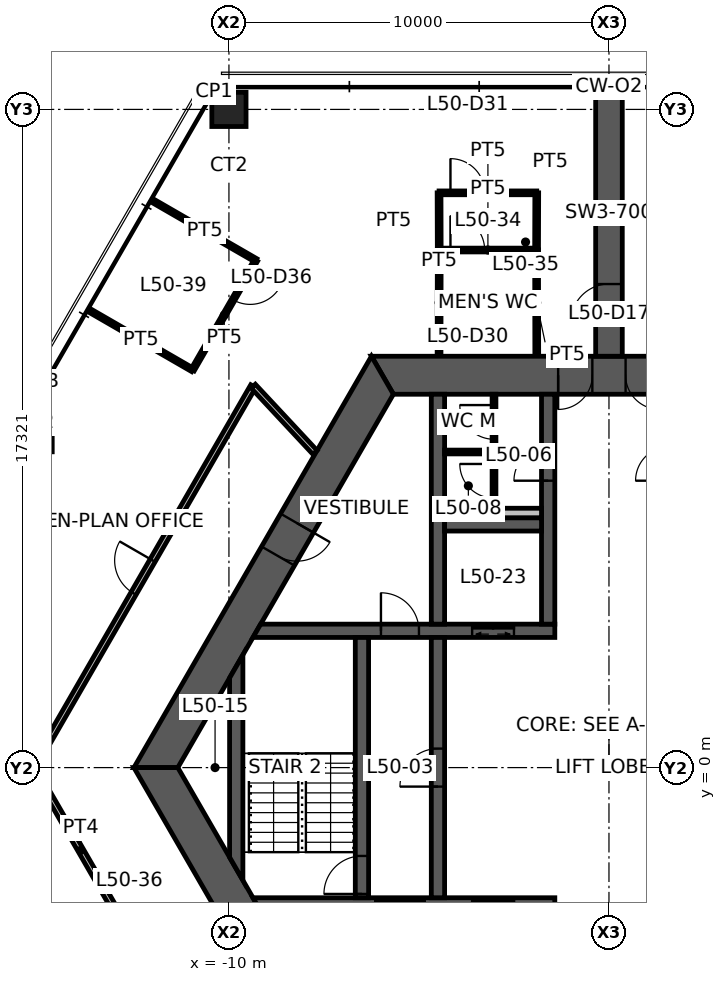
"""IFC4 building model, lengths in metres.
Left out: names, types, materials, properties, quantities, classifications, styles, units other than length and angle.
Written with IfcOpenShell. Run it as: python <this file> out.ifc"""

import sys

from ifc_helpers import new_model, si_unit, direction, frame, frame_2d, origin, origin_2d, place, context, subcontext, project, spatial, polyline, rectangle, hollow_rectangle, outline, extrude, element, fill, save


model = new_model("IFC4")
c1 = context("Model", 3, precision=1e-05, world=origin(), true_north=direction((0.0, 1.0)))
c2 = subcontext(c1, "Body", "Model", "MODEL_VIEW")
j1 = project(units=[si_unit("LENGTHUNIT", "METRE"), si_unit("PLANEANGLEUNIT", "RADIAN")], contexts=[c1])
p1 = place(None, origin())
s1 = spatial("IfcSite", under=j1, at=p1, CompositionType="ELEMENT")
p2 = place(p1, origin())
s2 = spatial("IfcBuilding", under=s1, at=p2, CompositionType="ELEMENT")
p3 = place(p2, frame((0.0, 0.0, 199.4)))
s3 = spatial("IfcBuildingStorey", under=s2, at=p3, CompositionType="ELEMENT", Elevation=199.4)
p4 = place(p3, frame((-10.0, 17.321, 0.0), z_axis=(0.0, 0.0, 1.0), x_axis=(1.0, 0.0, 0.0)))
e1 = element("IfcColumn", 1, at=p4, inside=s3, PredefinedType="COLUMN", context=c2, shape_type="SweptSolid", body=[
    extrude(hollow_rectangle(XDim=0.9, YDim=0.9, WallThickness=0.09, at=origin_2d()), origin(), (0.0, 0.0, 1.0), 3.9),
])
p5 = place(p3, frame((5.961, 10.325, 0.0), z_axis=(0.0, 0.0, 1.0), x_axis=(-1.0, 0.0, 0.0)))
e2 = element("IfcWall", 2, at=p5, inside=s3, PredefinedType="SHEAR", context=c2, shape_type="SweptSolid", body=[
    extrude(outline(polyline([(-0.289, -0.5), (4.624, -0.5), (5.523, -0.5), (6.399, -0.5), (7.299, -0.5), (12.211, -0.5), (11.634, 0.5), (7.299, 0.5), (6.399, 0.5), (5.523, 0.5), (4.624, 0.5), (0.289, 0.5), (-0.289, -0.5)])), origin(), (0.0, 0.0, 1.0), 3.9),
])
p6 = place(p5, frame((6.399, 0.0, 0.0)))
e3 = element("IfcOpeningElement", 3, at=p6, cuts=e2, PredefinedType="OPENING", context=c2, shape_type="SweptSolid", body=[
    extrude(rectangle(XDim=0.9, YDim=2.1, at=frame_2d((0.45, 1.05))), frame((0.0, 0.51, 0.0), z_axis=(0.0, -1.0, 0.0), x_axis=(1.0, 0.0, 0.0)), (0.0, 0.0, 1.0), 1.02),
])
p7 = place(p5, frame((4.624, 0.0, 0.0)))
e4 = element("IfcOpeningElement", 4, at=p7, cuts=e2, PredefinedType="OPENING", context=c2, shape_type="SweptSolid", body=[
    extrude(rectangle(XDim=0.9, YDim=2.1, at=frame_2d((0.45, 1.05))), frame((0.0, 0.51, 0.0), z_axis=(0.0, -1.0, 0.0), x_axis=(1.0, 0.0, 0.0)), (0.0, 0.0, 1.0), 1.02),
])
p8 = place(p3, frame((-5.961, 10.325, 0.0), z_axis=(0.0, 0.0, 1.0), x_axis=(-0.500004296715, -0.866022923061, 0.0)))
e5 = element("IfcWall", 5, at=p8, inside=s3, PredefinedType="SHEAR", context=c2, shape_type="SweptSolid", body=[
    extrude(outline(polyline([(-0.289, -0.5), (4.494, -0.5), (5.494, -0.5), (12.211, -0.5), (11.634, 0.5), (5.494, 0.5), (4.494, 0.5), (0.289, 0.5), (-0.289, -0.5)])), origin(), (0.0, 0.0, 1.0), 3.9),
])
p9 = place(p8, frame((4.494, 0.0, 0.0)))
e6 = element("IfcOpeningElement", 6, at=p9, cuts=e5, PredefinedType="OPENING", context=c2, shape_type="SweptSolid", body=[
    extrude(rectangle(XDim=1.0, YDim=2.1, at=frame_2d((0.5, 1.05))), frame((0.0, 0.51, 0.0), z_axis=(0.0, -1.0, 0.0), x_axis=(1.0, 0.0, 0.0)), (0.0, 0.0, 1.0), 1.02),
])
p10 = place(p3, frame((-11.922, 0.0, 0.0), z_axis=(0.0, 0.0, 1.0), x_axis=(0.500004296715, -0.866022923061, 0.0)))
e7 = element("IfcWall", 7, at=p10, inside=s3, PredefinedType="SHEAR", context=c2, shape_type="SweptSolid", body=[
    extrude(outline(polyline([(-0.289, -0.5), (6.331, -0.5), (7.131, -0.5), (12.211, -0.5), (11.634, 0.5), (7.131, 0.5), (6.331, 0.5), (0.289, 0.5), (-0.289, -0.5)])), origin(), (0.0, 0.0, 1.0), 3.9),
])
p11 = place(p10, frame((6.331, 0.0, 0.0)))
e8 = element("IfcOpeningElement", 8, at=p11, cuts=e7, PredefinedType="OPENING", context=c2, shape_type="SweptSolid", body=[
    extrude(rectangle(XDim=0.8, YDim=2.1, at=frame_2d((0.4, 1.05))), frame((0.0, 0.51, 0.0), z_axis=(0.0, -1.0, 0.0), x_axis=(1.0, 0.0, 0.0)), (0.0, 0.0, 1.0), 1.02),
])
p12 = place(p3, frame((0.0, 10.825, 0.0), z_axis=(0.0, 0.0, 1.0), x_axis=(0.0, 1.0, 0.0)))
e9 = element("IfcWall", 9, at=p12, inside=s3, PredefinedType="SHEAR", context=c2, shape_type="SweptSolid", body=[
    extrude(rectangle(XDim=6.946, YDim=0.7, at=frame_2d((3.473, 0.0))), origin(), (0.0, 0.0, 1.0), 3.9),
])
p13 = place(p12, frame((0.9, 0.0, 0.0)))
e10 = element("IfcOpeningElement", 10, at=p13, cuts=e9, PredefinedType="OPENING", context=c2, shape_type="SweptSolid", body=[
    extrude(rectangle(XDim=1.0, YDim=2.1, at=frame_2d((0.5, 1.05))), frame((0.0, 0.36, 0.0), z_axis=(0.0, -1.0, 0.0), x_axis=(1.0, 0.0, 0.0)), (0.0, 0.0, 1.0), 0.72),
])
p14 = place(p3, frame((-9.266, 3.6, 0.0), z_axis=(0.0, 0.0, 1.0), x_axis=(1.0, 0.0, 0.0)))
e11 = element("IfcWall", 11, at=p14, inside=s3, PredefinedType="SHEAR", context=c2, shape_type="SweptSolid", body=[
    extrude(outline(polyline([(-0.101, -0.175), (3.266, -0.175), (4.266, -0.175), (5.667, -0.175), (6.767, -0.175), (7.841, -0.175), (7.841, 0.175), (6.767, 0.175), (5.667, 0.175), (4.266, 0.175), (3.266, 0.175), (0.101, 0.175), (-0.101, -0.175)])), origin(), (0.0, 0.0, 1.0), 3.9),
])
p15 = place(p14, frame((3.266, 0.0, 0.0)))
e12 = element("IfcOpeningElement", 12, at=p15, cuts=e11, PredefinedType="OPENING", context=c2, shape_type="SweptSolid", body=[
    extrude(rectangle(XDim=1.0, YDim=2.1, at=frame_2d((0.5, 1.05))), frame((0.0, 0.185, 0.0), z_axis=(0.0, -1.0, 0.0), x_axis=(1.0, 0.0, 0.0)), (0.0, 0.0, 1.0), 0.37),
])
p16 = place(p14, frame((5.667, 0.0, 0.0)))
e13 = element("IfcOpeningElement", 13, at=p16, cuts=e11, PredefinedType="OPENING", context=c2, shape_type="SweptSolid", body=[
    extrude(rectangle(XDim=1.1, YDim=2.1, at=frame_2d((0.55, 1.05))), frame((0.0, 0.185, 0.0), z_axis=(0.0, -1.0, 0.0), x_axis=(1.0, 0.0, 0.0)), (0.0, 0.0, 1.0), 0.37),
])
p17 = place(p3, frame((-9.266, -3.6, 0.0), z_axis=(0.0, 0.0, 1.0), x_axis=(1.0, 0.0, 0.0)))
e14 = element("IfcWall", 14, at=p17, inside=s3, PredefinedType="SHEAR", context=c2, shape_type="SweptSolid", body=[
    extrude(outline(polyline([(0.101, -0.175), (3.116, -0.175), (4.417, -0.175), (5.667, -0.175), (6.767, -0.175), (7.841, -0.175), (7.841, 0.175), (6.767, 0.175), (5.667, 0.175), (4.417, 0.175), (3.116, 0.175), (-0.101, 0.175), (0.101, -0.175)])), origin(), (0.0, 0.0, 1.0), 3.9),
])
p18 = place(p17, frame((5.667, 0.0, 0.0)))
e15 = element("IfcOpeningElement", 15, at=p18, cuts=e14, PredefinedType="OPENING", context=c2, shape_type="SweptSolid", body=[
    extrude(rectangle(XDim=1.1, YDim=2.1, at=frame_2d((0.55, 1.05))), frame((0.0, 0.185, 0.0), z_axis=(0.0, -1.0, 0.0), x_axis=(1.0, 0.0, 0.0)), (0.0, 0.0, 1.0), 0.37),
])
p19 = place(p17, frame((3.116, 0.0, 0.0)))
e16 = element("IfcOpeningElement", 16, at=p19, cuts=e14, PredefinedType="OPENING", context=c2, shape_type="SweptSolid", body=[
    extrude(rectangle(XDim=1.3, YDim=2.1, at=frame_2d((0.65, 1.05))), frame((0.0, 0.185, 0.0), z_axis=(0.0, -1.0, 0.0), x_axis=(1.0, 0.0, 0.0)), (0.0, 0.0, 1.0), 0.37),
])
p20 = place(p3, frame((-1.6, 3.775, 0.0), z_axis=(0.0, 0.0, 1.0), x_axis=(0.0, 1.0, 0.0)))
e17 = element("IfcWall", 17, at=p20, inside=s3, PredefinedType="SHEAR", context=c2, shape_type="SweptSolid", body=[
    extrude(rectangle(XDim=6.05, YDim=0.35, at=frame_2d((3.025, 0.0))), origin(), (0.0, 0.0, 1.0), 3.9),
])
p21 = place(p20, frame((3.775, 0.0, 0.0)))
e18 = element("IfcOpeningElement", 18, at=p21, cuts=e17, PredefinedType="OPENING", context=c2, shape_type="SweptSolid", body=[
    extrude(rectangle(XDim=0.9, YDim=2.1, at=frame_2d((0.45, 1.05))), frame((0.0, 0.185, 0.0), z_axis=(0.0, -1.0, 0.0), x_axis=(1.0, 0.0, 0.0)), (0.0, 0.0, 1.0), 0.37),
])
p22 = place(p3, frame((-4.5, -3.425, 0.0), z_axis=(0.0, 0.0, 1.0), x_axis=(0.0, 1.0, 0.0)))
e19 = element("IfcWall", 19, at=p22, inside=s3, PredefinedType="SHEAR", context=c2, shape_type="SweptSolid", body=[
    extrude(rectangle(XDim=6.85, YDim=0.35, at=frame_2d((3.425, 0.0))), origin(), (0.0, 0.0, 1.0), 3.9),
])
p23 = place(p22, frame((2.925, 0.0, 0.0)))
e20 = element("IfcOpeningElement", 20, at=p23, cuts=e19, PredefinedType="OPENING", context=c2, shape_type="SweptSolid", body=[
    extrude(rectangle(XDim=1.0, YDim=2.1, at=frame_2d((0.5, 1.05))), frame((0.0, 0.185, 0.0), z_axis=(0.0, -1.0, 0.0), x_axis=(1.0, 0.0, 0.0)), (0.0, 0.0, 1.0), 0.37),
])
p24 = place(p3, frame((-6.5, -3.425, 0.0), z_axis=(0.0, 0.0, 1.0), x_axis=(0.0, 1.0, 0.0)))
e21 = element("IfcWall", 21, at=p24, inside=s3, PredefinedType="SHEAR", context=c2, shape_type="SweptSolid", body=[
    extrude(rectangle(XDim=6.85, YDim=0.35, at=frame_2d((3.425, 0.0))), origin(), (0.0, 0.0, 1.0), 3.9),
])
p25 = place(p24, frame((0.1, 0.0, 0.0)))
e22 = element("IfcOpeningElement", 22, at=p25, cuts=e21, PredefinedType="OPENING", context=c2, shape_type="SweptSolid", body=[
    extrude(rectangle(XDim=1.0, YDim=2.1, at=frame_2d((0.5, 1.05))), frame((0.0, 0.185, 0.0), z_axis=(0.0, -1.0, 0.0), x_axis=(1.0, 0.0, 0.0)), (0.0, 0.0, 1.0), 0.37),
])
p26 = place(p3, frame((-4.5, 3.775, 0.0), z_axis=(0.0, 0.0, 1.0), x_axis=(0.0, 1.0, 0.0)))
e23 = element("IfcWall", 23, at=p26, inside=s3, PredefinedType="SHEAR", context=c2, shape_type="SweptSolid", body=[
    extrude(rectangle(XDim=6.05, YDim=0.35, at=frame_2d((3.025, 0.0))), origin(), (0.0, 0.0, 1.0), 3.9),
])
p27 = place(p3, frame((-4.325, 6.4, 0.0), z_axis=(0.0, 0.0, 1.0), x_axis=(1.0, 0.0, 0.0)))
e24 = element("IfcWall", 24, at=p27, inside=s3, PredefinedType="SHEAR", context=c2, shape_type="SweptSolid", body=[
    extrude(rectangle(XDim=2.55, YDim=0.35, at=frame_2d((1.275, 0.0))), origin(), (0.0, 0.0, 1.0), 3.9),
])
p28 = place(p3, frame((-9.808, -2.662, 0.0), z_axis=(0.0, 0.0, 1.0), x_axis=(0.0, 1.0, 0.0)))
e25 = element("IfcWall", 25, at=p28, inside=s3, PredefinedType="SHEAR", context=c2, shape_type="SweptSolid", body=[
    extrude(outline(polyline([(-0.303, -0.175), (5.628, -0.175), (5.021, 0.175), (0.303, 0.175), (-0.303, -0.175)])), origin(), (0.0, 0.0, 1.0), 3.9),
])
p29 = place(p3, frame((-4.325, 6.7, 0.0), z_axis=(0.0, 0.0, 1.0), x_axis=(1.0, 0.0, 0.0)))
e26 = element("IfcWall", 26, at=p29, inside=s3, PredefinedType="PLUMBINGWALL", context=c2, shape_type="SweptSolid", body=[
    extrude(rectangle(XDim=2.55, YDim=0.25, at=frame_2d((1.275, 0.0))), origin(), (0.0, 0.0, 1.0), 3.9),
])
p30 = place(p3, frame((-3.025, 6.575, 0.0), z_axis=(0.0, 0.0, 1.0), x_axis=(0.0, 1.0, 0.0)))
e27 = element("IfcWall", 27, at=p30, inside=s3, PredefinedType="PARTITIONING", context=c2, shape_type="SweptSolid", body=[
    extrude(rectangle(XDim=3.25, YDim=0.1, at=frame_2d((1.625, 0.0))), origin(), (0.0, 0.0, 1.0), 2.35),
])
p31 = place(p30, frame((2.065, 0.0, 0.0)))
e28 = element("IfcOpeningElement", 28, at=p31, cuts=e27, PredefinedType="OPENING", context=c2, shape_type="SweptSolid", body=[
    extrude(rectangle(XDim=0.9, YDim=2.1, at=frame_2d((0.45, 1.05))), frame((0.0, 0.06, 0.0), z_axis=(0.0, -1.0, 0.0), x_axis=(1.0, 0.0, 0.0)), (0.0, 0.0, 1.0), 0.12),
])
p32 = place(p30, frame((0.515, 0.0, 0.0)))
e29 = element("IfcOpeningElement", 29, at=p32, cuts=e27, PredefinedType="OPENING", context=c2, shape_type="SweptSolid", body=[
    extrude(rectangle(XDim=0.9, YDim=2.1, at=frame_2d((0.45, 1.05))), frame((0.0, 0.06, 0.0), z_axis=(0.0, -1.0, 0.0), x_axis=(1.0, 0.0, 0.0)), (0.0, 0.0, 1.0), 0.12),
])
p33 = place(p3, frame((-3.075, 8.305, 0.0), z_axis=(0.0, 0.0, 1.0), x_axis=(-1.0, 0.0, 0.0)))
e30 = element("IfcWall", 30, at=p33, inside=s3, PredefinedType="PARTITIONING", context=c2, shape_type="SweptSolid", body=[
    extrude(rectangle(XDim=1.25, YDim=0.1, at=frame_2d((0.625, 0.0))), origin(), (0.0, 0.0, 1.0), 2.35),
])
p34 = place(p3, frame((-4.471, 13.62, 0.0), z_axis=(0.0, 0.0, 1.0), x_axis=(1.0, 0.0, 0.0)))
e31 = element("IfcWall", 31, at=p34, inside=s3, PredefinedType="PARTITIONING", context=c2, shape_type="SweptSolid", body=[
    extrude(rectangle(XDim=2.571, YDim=0.1, at=frame_2d((1.286, 0.0))), origin(), (0.0, 0.0, 1.0), 2.35),
])
p35 = place(p34, frame((0.3, 0.0, 0.0)))
e32 = element("IfcOpeningElement", 32, at=p35, cuts=e31, PredefinedType="OPENING", context=c2, shape_type="SweptSolid", body=[
    extrude(rectangle(XDim=0.9, YDim=2.1, at=frame_2d((0.45, 1.05))), frame((0.0, 0.06, 0.0), z_axis=(0.0, -1.0, 0.0), x_axis=(1.0, 0.0, 0.0)), (0.0, 0.0, 1.0), 0.12),
])
for number, where, z_axis, x_axis in (
    (33, (-4.471, 10.845, 0.0), (0.0, 0.0, 1.0), (0.002, 1.0, 0.0)),
    (34, (-1.905, 13.625, 0.0), (0.0, 0.0, 1.0), (0.002, -1.0, 0.0)),
):
    element("IfcWall", number, at=place(p3, frame(where, z_axis=z_axis, x_axis=x_axis)), inside=s3, PredefinedType="PARTITIONING", context=c2, shape_type="SweptSolid", body=[
        extrude(rectangle(XDim=2.78, YDim=0.1, at=frame_2d((1.39, 0.0))), origin(), (0.0, 0.0, 1.0), 2.35),
    ])
p36 = place(p3, frame((-4.471, 15.125, 0.0), z_axis=(0.0, 0.0, 1.0), x_axis=(1.0, 0.0, 0.0)))
e35 = element("IfcWall", 35, at=p36, inside=s3, PredefinedType="PARTITIONING", context=c2, shape_type="SweptSolid", body=[
    extrude(rectangle(XDim=2.571, YDim=0.1, at=frame_2d((1.286, 0.0))), origin(), (0.0, 0.0, 1.0), 2.35),
])
p37 = place(p36, frame((0.3, 0.0, 0.0)))
e36 = element("IfcOpeningElement", 36, at=p37, cuts=e35, PredefinedType="OPENING", context=c2, shape_type="SweptSolid", body=[
    extrude(rectangle(XDim=0.9, YDim=2.1, at=frame_2d((0.45, 1.05))), frame((0.0, 0.06, 0.0), z_axis=(0.0, -1.0, 0.0), x_axis=(1.0, 0.0, 0.0)), (0.0, 0.0, 1.0), 0.12),
])
for number, where, z_axis, x_axis in (
    (37, (-4.466, 13.625, 0.0), (0.0, 0.0, 1.0), (-0.003, 1.0, 0.0)),
    (38, (-1.9, 15.125, 0.0), (0.0, 0.0, 1.0), (-0.003, -1.0, 0.0)),
):
    element("IfcWall", number, at=place(p3, frame(where, z_axis=z_axis, x_axis=x_axis)), inside=s3, PredefinedType="PARTITIONING", context=c2, shape_type="SweptSolid", body=[
        extrude(rectangle(XDim=1.5, YDim=0.1, at=frame_2d((0.75, 0.0))), origin(), (0.0, 0.0, 1.0), 2.35),
    ])
p38 = place(p3, frame((-15.156, 0.0, 0.0), z_axis=(0.0, 0.0, 1.0), x_axis=(0.500012970505, 0.86601791513, 0.0)))
e39 = element("IfcWall", 39, at=p38, inside=s3, PredefinedType="PARTITIONING", context=c2, shape_type="SweptSolid", body=[
    extrude(rectangle(XDim=11.591, YDim=0.15, at=frame_2d((5.795, 0.0))), origin(), (0.0, 0.0, 1.0), 2.35),
])
p39 = place(p38, frame((5.295, 0.0, 0.0)))
e40 = element("IfcOpeningElement", 40, at=p39, cuts=e39, PredefinedType="OPENING", context=c2, shape_type="SweptSolid", body=[
    extrude(rectangle(XDim=1.0, YDim=2.1, at=frame_2d((0.5, 1.05))), frame((0.0, 0.085, 0.0), z_axis=(0.0, -1.0, 0.0), x_axis=(1.0, 0.0, 0.0)), (0.0, 0.0, 1.0), 0.17),
])
p40 = place(p3, frame((-12.642, -4.354, 0.0), z_axis=(0.0, 0.0, 1.0), x_axis=(-0.500019495363, 0.866014147839, 0.0)))
e41 = element("IfcWall", 41, at=p40, inside=s3, PredefinedType="PARTITIONING", context=c2, shape_type="SweptSolid", body=[
    extrude(rectangle(XDim=5.028, YDim=0.15, at=frame_2d((2.514, 0.0))), origin(), (0.0, 0.0, 1.0), 2.35),
])
p41 = place(p3, frame((-9.36, 10.038, 0.0), z_axis=(0.0, 0.0, 1.0), x_axis=(0.681997114248, -0.731354863358, 0.0)))
e42 = element("IfcWall", 42, at=p41, inside=s3, PredefinedType="PARTITIONING", context=c2, shape_type="SweptSolid", body=[
    extrude(outline(polyline([(0.0, -0.075), (2.384, -0.075), (2.384, 0.0), (2.382, 0.075), (0.0, 0.075), (0.0, -0.075)])), origin(), (0.0, 0.0, 1.0), 2.35),
])
p42 = place(p3, frame((-11.98, 14.902, 0.0), z_axis=(0.0, 0.0, 1.0), x_axis=(0.866042875753, -0.499969736442, 0.0)))
e43 = element("IfcWall", 43, at=p42, inside=s3, PredefinedType="PARTITIONING", context=c2, shape_type="SweptSolid", body=[
    extrude(rectangle(XDim=3.105, YDim=0.1, at=frame_2d((1.553, 0.0))), origin(), (0.0, 0.0, 1.0), 2.35),
])
p43 = place(p3, frame((-10.956, 10.465, 0.0), z_axis=(0.0, 0.0, 1.0), x_axis=(-0.866012296238, 0.500022702249, 0.0)))
e44 = element("IfcWall", 44, at=p43, inside=s3, PredefinedType="PARTITIONING", context=c2, shape_type="SweptSolid", body=[
    extrude(rectangle(XDim=3.144, YDim=0.1, at=frame_2d((1.572, 0.0))), origin(), (0.0, 0.0, 1.0), 2.35),
])
p44 = place(p3, frame((-9.291, 13.349, 0.0), z_axis=(0.0, 0.0, 1.0), x_axis=(-0.500033344505, -0.86600615147, 0.0)))
e45 = element("IfcWall", 45, at=p44, inside=s3, PredefinedType="PARTITIONING", context=c2, shape_type="SweptSolid", body=[
    extrude(rectangle(XDim=3.331, YDim=0.1, at=frame_2d((1.666, 0.0))), origin(), (0.0, 0.0, 1.0), 2.35),
])
p45 = place(p44, frame((0.3, 0.0, 0.0)))
e46 = element("IfcOpeningElement", 46, at=p45, cuts=e45, PredefinedType="OPENING", context=c2, shape_type="SweptSolid", body=[
    extrude(rectangle(XDim=0.9, YDim=2.1, at=frame_2d((0.45, 1.05))), frame((0.0, 0.06, 0.0), z_axis=(0.0, -1.0, 0.0), x_axis=(1.0, 0.0, 0.0)), (0.0, 0.0, 1.0), 0.12),
])
p46 = place(p3, frame((0.0, 17.771, 0.0), z_axis=(0.0, 0.0, 1.0), x_axis=(0.0, 1.0, 0.0)))
e47 = element("IfcWall", 47, at=p46, inside=s3, PredefinedType="PARTITIONING", context=c2, shape_type="SweptSolid", body=[
    extrude(rectangle(XDim=0.08, YDim=0.175, at=frame_2d((0.04, 0.0))), origin(), (0.0, 0.0, 1.0), 3.9),
])
p47 = place(p6, origin())
e48 = element("IfcDoor", 48, at=p47, inside=s3, OperationType="SINGLE_SWING_RIGHT", PredefinedType="DOOR", context=c2, shape_type="SweptSolid", body=[
    extrude(rectangle(XDim=0.9, YDim=2.1, at=frame_2d((0.45, 1.05))), frame((0.0, 0.025, 0.0), z_axis=(0.0, -1.0, 0.0), x_axis=(1.0, 0.0, 0.0)), (0.0, 0.0, 1.0), 0.05),
])
fill(e3, e48)
p48 = place(p7, origin())
e49 = element("IfcDoor", 49, at=p48, inside=s3, OperationType="SINGLE_SWING_LEFT", PredefinedType="DOOR", context=c2, shape_type="SweptSolid", body=[
    extrude(rectangle(XDim=0.9, YDim=2.1, at=frame_2d((0.45, 1.05))), frame((0.0, 0.025, 0.0), z_axis=(0.0, -1.0, 0.0), x_axis=(1.0, 0.0, 0.0)), (0.0, 0.0, 1.0), 0.05),
])
fill(e4, e49)
p49 = place(p9, origin())
e50 = element("IfcDoor", 50, at=p49, inside=s3, OperationType="SINGLE_SWING_LEFT", PredefinedType="DOOR", context=c2, shape_type="SweptSolid", body=[
    extrude(rectangle(XDim=1.0, YDim=2.1, at=frame_2d((0.5, 1.05))), frame((0.0, 0.025, 0.0), z_axis=(0.0, -1.0, 0.0), x_axis=(1.0, 0.0, 0.0)), (0.0, 0.0, 1.0), 0.05),
])
fill(e6, e50)
p50 = place(p23, origin())
e51 = element("IfcDoor", 51, at=p50, inside=s3, OperationType="SINGLE_SWING_LEFT", PredefinedType="DOOR", context=c2, shape_type="SweptSolid", body=[
    extrude(rectangle(XDim=1.0, YDim=2.1, at=frame_2d((0.5, 1.05))), frame((0.0, 0.025, 0.0), z_axis=(0.0, -1.0, 0.0), x_axis=(1.0, 0.0, 0.0)), (0.0, 0.0, 1.0), 0.05),
])
fill(e20, e51)
p51 = place(p25, origin())
e52 = element("IfcDoor", 52, at=p51, inside=s3, OperationType="SINGLE_SWING_LEFT", PredefinedType="DOOR", context=c2, shape_type="SweptSolid", body=[
    extrude(rectangle(XDim=1.0, YDim=2.1, at=frame_2d((0.5, 1.05))), frame((0.0, 0.025, 0.0), z_axis=(0.0, -1.0, 0.0), x_axis=(1.0, 0.0, 0.0)), (0.0, 0.0, 1.0), 0.05),
])
fill(e22, e52)
p52 = place(p15, origin())
e53 = element("IfcDoor", 53, at=p52, inside=s3, OperationType="SINGLE_SWING_LEFT", PredefinedType="DOOR", context=c2, shape_type="SweptSolid", body=[
    extrude(rectangle(XDim=1.0, YDim=2.1, at=frame_2d((0.5, 1.05))), frame((0.0, 0.025, 0.0), z_axis=(0.0, -1.0, 0.0), x_axis=(1.0, 0.0, 0.0)), (0.0, 0.0, 1.0), 0.05),
])
fill(e12, e53)
p53 = place(p21, origin())
e54 = element("IfcDoor", 54, at=p53, inside=s3, OperationType="SINGLE_SWING_LEFT", PredefinedType="DOOR", context=c2, shape_type="SweptSolid", body=[
    extrude(rectangle(XDim=0.9, YDim=2.1, at=frame_2d((0.45, 1.05))), frame((0.0, 0.025, 0.0), z_axis=(0.0, -1.0, 0.0), x_axis=(1.0, 0.0, 0.0)), (0.0, 0.0, 1.0), 0.05),
])
fill(e18, e54)
p54 = place(p13, origin())
e55 = element("IfcDoor", 55, at=p54, inside=s3, OperationType="SINGLE_SWING_LEFT", PredefinedType="DOOR", context=c2, shape_type="SweptSolid", body=[
    extrude(rectangle(XDim=1.0, YDim=2.1, at=frame_2d((0.5, 1.05))), frame((0.0, 0.025, 0.0), z_axis=(0.0, -1.0, 0.0), x_axis=(1.0, 0.0, 0.0)), (0.0, 0.0, 1.0), 0.05),
])
fill(e10, e55)
p55 = place(p31, origin())
e56 = element("IfcDoor", 56, at=p55, inside=s3, OperationType="SINGLE_SWING_RIGHT", PredefinedType="DOOR", context=c2, shape_type="SweptSolid", body=[
    extrude(rectangle(XDim=0.9, YDim=2.1, at=frame_2d((0.45, 1.05))), frame((0.0, 0.025, 0.0), z_axis=(0.0, -1.0, 0.0), x_axis=(1.0, 0.0, 0.0)), (0.0, 0.0, 1.0), 0.05),
])
fill(e28, e56)
p56 = place(p32, origin())
e57 = element("IfcDoor", 57, at=p56, inside=s3, OperationType="SINGLE_SWING_RIGHT", PredefinedType="DOOR", context=c2, shape_type="SweptSolid", body=[
    extrude(rectangle(XDim=0.9, YDim=2.1, at=frame_2d((0.45, 1.05))), frame((0.0, 0.025, 0.0), z_axis=(0.0, -1.0, 0.0), x_axis=(1.0, 0.0, 0.0)), (0.0, 0.0, 1.0), 0.05),
])
fill(e29, e57)
p57 = place(p35, origin())
e58 = element("IfcDoor", 58, at=p57, inside=s3, OperationType="SINGLE_SWING_LEFT", PredefinedType="DOOR", context=c2, shape_type="SweptSolid", body=[
    extrude(rectangle(XDim=0.9, YDim=2.1, at=frame_2d((0.45, 1.05))), frame((0.0, 0.025, 0.0), z_axis=(0.0, -1.0, 0.0), x_axis=(1.0, 0.0, 0.0)), (0.0, 0.0, 1.0), 0.05),
])
fill(e32, e58)
p58 = place(p37, origin())
e59 = element("IfcDoor", 59, at=p58, inside=s3, OperationType="SINGLE_SWING_LEFT", PredefinedType="DOOR", context=c2, shape_type="SweptSolid", body=[
    extrude(rectangle(XDim=0.9, YDim=2.1, at=frame_2d((0.45, 1.05))), frame((0.0, 0.025, 0.0), z_axis=(0.0, -1.0, 0.0), x_axis=(1.0, 0.0, 0.0)), (0.0, 0.0, 1.0), 0.05),
])
fill(e36, e59)
p59 = place(p39, origin())
e60 = element("IfcDoor", 60, at=p59, inside=s3, OperationType="SINGLE_SWING_RIGHT", PredefinedType="DOOR", context=c2, shape_type="SweptSolid", body=[
    extrude(rectangle(XDim=1.0, YDim=2.1, at=frame_2d((0.5, 1.05))), frame((0.0, 0.025, 0.0), z_axis=(0.0, -1.0, 0.0), x_axis=(1.0, 0.0, 0.0)), (0.0, 0.0, 1.0), 0.05),
])
fill(e40, e60)
p60 = place(p45, origin())
e61 = element("IfcDoor", 61, at=p60, inside=s3, OperationType="SINGLE_SWING_LEFT", PredefinedType="DOOR", context=c2, shape_type="SweptSolid", body=[
    extrude(rectangle(XDim=0.9, YDim=2.1, at=frame_2d((0.45, 1.05))), frame((0.0, 0.025, 0.0), z_axis=(0.0, -1.0, 0.0), x_axis=(1.0, 0.0, 0.0)), (0.0, 0.0, 1.0), 0.05),
])
fill(e46, e61)
p61 = place(p16, origin())
e62 = element("IfcDoor", 62, at=p61, inside=s3, OperationType="DOUBLE_DOOR_SLIDING", PredefinedType="DOOR", context=c2, shape_type="SweptSolid", body=[
    extrude(rectangle(XDim=1.1, YDim=2.1, at=frame_2d((0.55, 1.05))), frame((0.0, 0.025, 0.0), z_axis=(0.0, -1.0, 0.0), x_axis=(1.0, 0.0, 0.0)), (0.0, 0.0, 1.0), 0.05),
])
fill(e13, e62)
save(model, sys.argv[1])
